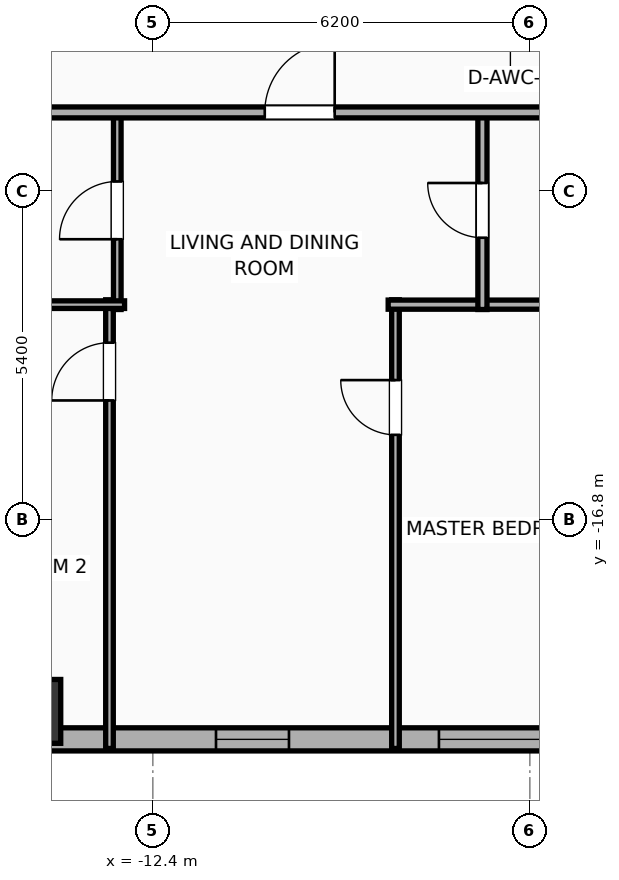
"""IFC4 building model, lengths in metres.
Left out: names, types, materials, properties, quantities, classifications, styles, units other than length and angle.
Written with IfcOpenShell. Run it as: python <this file> out.ifc"""

import sys

from ifc_helpers import new_model, si_unit, direction, frame, frame_2d, origin, origin_2d, place, context, subcontext, project, spatial, rectangle, hollow_rectangle, extrude, element, fill, save


model = new_model("IFC4")
c1 = context("Model", 3, precision=1e-05, world=origin(), true_north=direction((0.0, 1.0)))
c2 = subcontext(c1, "Body", "Model", "MODEL_VIEW")
j1 = project(units=[si_unit("LENGTHUNIT", "METRE"), si_unit("PLANEANGLEUNIT", "RADIAN")], contexts=[c1])
p1 = place(None, origin())
s1 = spatial("IfcSite", under=j1, at=p1, CompositionType="ELEMENT")
p2 = place(p1, origin())
s2 = spatial("IfcBuilding", under=s1, at=p2, CompositionType="ELEMENT")
p3 = place(p2, frame((0.0, 0.0, 105.3)))
s3 = spatial("IfcBuildingStorey", under=s2, at=p3, CompositionType="ELEMENT", Elevation=105.3)
p4 = place(p3, frame((-14.44, -19.95, 0.0), z_axis=(0.0, 0.0, 1.0), x_axis=(1.0, 0.0, 0.0)))
e1 = element("IfcColumn", 1, at=p4, inside=s3, PredefinedType="COLUMN", context=c2, shape_type="SweptSolid", body=[
    extrude(hollow_rectangle(XDim=1.05, YDim=1.05, WallThickness=0.036, at=origin_2d()), origin(), (0.0, 0.0, 1.0), 3.9),
])
p5 = place(p3, frame((29.381, -20.41, 0.0), z_axis=(0.0, 0.0, 1.0), x_axis=(-1.0, 0.0, 0.0)))
e2 = element("IfcWall", 2, at=p5, inside=s3, PredefinedType="ELEMENTEDWALL", context=c2, shape_type="SweptSolid", body=[
    extrude(rectangle(XDim=54.763, YDim=0.38, at=frame_2d((27.381, 0.0))), origin(), (0.0, 0.0, 1.0), 3.65),
])
p6 = place(p5, frame((6.495, 0.0, 0.75)))
e3 = element("IfcOpeningElement", 3, at=p6, cuts=e2, PredefinedType="OPENING", context=c2, shape_type="SweptSolid", body=[
    extrude(rectangle(XDim=2.4, YDim=2.1, at=frame_2d((1.2, 1.05))), frame((0.0, 0.2, 0.0), z_axis=(0.0, -1.0, 0.0), x_axis=(1.0, 0.0, 0.0)), (0.0, 0.0, 1.0), 0.4),
])
p7 = place(p5, frame((17.686, 0.0, 0.75)))
e4 = element("IfcOpeningElement", 4, at=p7, cuts=e2, PredefinedType="OPENING", context=c2, shape_type="SweptSolid", body=[
    extrude(rectangle(XDim=2.4, YDim=2.1, at=frame_2d((1.2, 1.05))), frame((0.0, 0.2, 0.0), z_axis=(0.0, -1.0, 0.0), x_axis=(1.0, 0.0, 0.0)), (0.0, 0.0, 1.0), 0.4),
])
p8 = place(p5, frame((34.677, 0.0, 0.75)))
e5 = element("IfcOpeningElement", 5, at=p8, cuts=e2, PredefinedType="OPENING", context=c2, shape_type="SweptSolid", body=[
    extrude(rectangle(XDim=2.4, YDim=2.1, at=frame_2d((1.2, 1.05))), frame((0.0, 0.2, 0.0), z_axis=(0.0, -1.0, 0.0), x_axis=(1.0, 0.0, 0.0)), (0.0, 0.0, 1.0), 0.4),
])
p9 = place(p5, frame((45.867, 0.0, 0.75)))
e6 = element("IfcOpeningElement", 6, at=p9, cuts=e2, PredefinedType="OPENING", context=c2, shape_type="SweptSolid", body=[
    extrude(rectangle(XDim=2.4, YDim=2.1, at=frame_2d((1.2, 1.05))), frame((0.0, 0.2, 0.0), z_axis=(0.0, -1.0, 0.0), x_axis=(1.0, 0.0, 0.0)), (0.0, 0.0, 1.0), 0.4),
])
p10 = place(p5, frame((52.281, 0.0, 0.75)))
e7 = element("IfcOpeningElement", 7, at=p10, cuts=e2, PredefinedType="OPENING", context=c2, shape_type="SweptSolid", body=[
    extrude(rectangle(XDim=1.2, YDim=2.05, at=frame_2d((0.6, 1.025))), frame((0.0, 0.2, 0.0), z_axis=(0.0, -1.0, 0.0), x_axis=(1.0, 0.0, 0.0)), (0.0, 0.0, 1.0), 0.4),
])
p11 = place(p5, frame((49.641, 0.0, 0.75)))
e8 = element("IfcOpeningElement", 8, at=p11, cuts=e2, PredefinedType="OPENING", context=c2, shape_type="SweptSolid", body=[
    extrude(rectangle(XDim=1.2, YDim=2.05, at=frame_2d((0.6, 1.025))), frame((0.0, 0.2, 0.0), z_axis=(0.0, -1.0, 0.0), x_axis=(1.0, 0.0, 0.0)), (0.0, 0.0, 1.0), 0.4),
])
p12 = place(p5, frame((39.543, 0.0, 0.75)))
e9 = element("IfcOpeningElement", 9, at=p12, cuts=e2, PredefinedType="OPENING", context=c2, shape_type="SweptSolid", body=[
    extrude(rectangle(XDim=1.2, YDim=2.05, at=frame_2d((0.6, 1.025))), frame((0.0, 0.2, 0.0), z_axis=(0.0, -1.0, 0.0), x_axis=(1.0, 0.0, 0.0)), (0.0, 0.0, 1.0), 0.4),
])
p13 = place(p5, frame((44.538, 0.0, 0.75)))
e10 = element("IfcOpeningElement", 10, at=p13, cuts=e2, PredefinedType="OPENING", context=c2, shape_type="SweptSolid", body=[
    extrude(rectangle(XDim=0.52, YDim=2.05, at=frame_2d((0.26, 1.025))), frame((0.0, 0.2, 0.0), z_axis=(0.0, -1.0, 0.0), x_axis=(1.0, 0.0, 0.0)), (0.0, 0.0, 1.0), 0.4),
])
p14 = place(p5, frame((28.206, 0.0, 0.75)))
e11 = element("IfcOpeningElement", 11, at=p14, cuts=e2, PredefinedType="OPENING", context=c2, shape_type="SweptSolid", body=[
    extrude(rectangle(XDim=1.2, YDim=2.05, at=frame_2d((0.6, 1.025))), frame((0.0, 0.2, 0.0), z_axis=(0.0, -1.0, 0.0), x_axis=(1.0, 0.0, 0.0)), (0.0, 0.0, 1.0), 0.4),
])
p15 = place(p5, frame((31.241, 0.0, 0.75)))
e12 = element("IfcOpeningElement", 12, at=p15, cuts=e2, PredefinedType="OPENING", context=c2, shape_type="SweptSolid", body=[
    extrude(rectangle(XDim=0.85, YDim=2.05, at=frame_2d((0.425, 1.025))), frame((0.0, 0.2, 0.0), z_axis=(0.0, -1.0, 0.0), x_axis=(1.0, 0.0, 0.0)), (0.0, 0.0, 1.0), 0.4),
])
p16 = place(p5, frame((24.561, 0.0, 0.75)))
e13 = element("IfcOpeningElement", 13, at=p16, cuts=e2, PredefinedType="OPENING", context=c2, shape_type="SweptSolid", body=[
    extrude(rectangle(XDim=1.2, YDim=2.05, at=frame_2d((0.6, 1.025))), frame((0.0, 0.2, 0.0), z_axis=(0.0, -1.0, 0.0), x_axis=(1.0, 0.0, 0.0)), (0.0, 0.0, 1.0), 0.4),
])
p17 = place(p5, frame((22.561, 0.0, 0.75)))
e14 = element("IfcOpeningElement", 14, at=p17, cuts=e2, PredefinedType="OPENING", context=c2, shape_type="SweptSolid", body=[
    extrude(rectangle(XDim=0.52, YDim=2.05, at=frame_2d((0.26, 1.025))), frame((0.0, 0.2, 0.0), z_axis=(0.0, -1.0, 0.0), x_axis=(1.0, 0.0, 0.0)), (0.0, 0.0, 1.0), 0.4),
])
p18 = place(p5, frame((13.886, 0.0, 0.75)))
e15 = element("IfcOpeningElement", 15, at=p18, cuts=e2, PredefinedType="OPENING", context=c2, shape_type="SweptSolid", body=[
    extrude(rectangle(XDim=1.2, YDim=2.05, at=frame_2d((0.6, 1.025))), frame((0.0, 0.2, 0.0), z_axis=(0.0, -1.0, 0.0), x_axis=(1.0, 0.0, 0.0)), (0.0, 0.0, 1.0), 0.4),
])
p19 = place(p5, frame((11.694, 0.0, 0.75)))
e16 = element("IfcOpeningElement", 16, at=p19, cuts=e2, PredefinedType="OPENING", context=c2, shape_type="SweptSolid", body=[
    extrude(rectangle(XDim=0.85, YDim=2.05, at=frame_2d((0.425, 1.025))), frame((0.0, 0.2, 0.0), z_axis=(0.0, -1.0, 0.0), x_axis=(1.0, 0.0, 0.0)), (0.0, 0.0, 1.0), 0.4),
])
p20 = place(p5, frame((3.286, 0.0, 0.75)))
e17 = element("IfcOpeningElement", 17, at=p20, cuts=e2, PredefinedType="OPENING", context=c2, shape_type="SweptSolid", body=[
    extrude(rectangle(XDim=1.2, YDim=2.05, at=frame_2d((0.6, 1.025))), frame((0.0, 0.2, 0.0), z_axis=(0.0, -1.0, 0.0), x_axis=(1.0, 0.0, 0.0)), (0.0, 0.0, 1.0), 0.4),
])
p21 = place(p5, frame((0.816, 0.0, 0.75)))
e18 = element("IfcOpeningElement", 18, at=p21, cuts=e2, PredefinedType="OPENING", context=c2, shape_type="SweptSolid", body=[
    extrude(rectangle(XDim=1.2, YDim=2.05, at=frame_2d((0.6, 1.025))), frame((0.0, 0.2, 0.0), z_axis=(0.0, -1.0, 0.0), x_axis=(1.0, 0.0, 0.0)), (0.0, 0.0, 1.0), 0.4),
])
p22 = place(p3, frame((-13.113, -20.56, 0.0), z_axis=(0.0, 0.0, 1.0), x_axis=(0.0, 1.0, 0.0)))
e19 = element("IfcWall", 19, at=p22, inside=s3, PredefinedType="PARTITIONING", context=c2, shape_type="SweptSolid", body=[
    extrude(rectangle(XDim=7.379, YDim=0.125, at=frame_2d((3.689, 0.0))), origin(), (0.0, 0.0, 1.0), 3.65),
])
p23 = place(p22, frame((5.723, 0.0, 0.0)))
e20 = element("IfcOpeningElement", 20, at=p23, cuts=e19, PredefinedType="OPENING", context=c2, shape_type="SweptSolid", body=[
    extrude(rectangle(XDim=0.95, YDim=2.05, at=frame_2d((0.475, 1.025))), frame((0.0, 0.073, 0.0), z_axis=(0.0, -1.0, 0.0), x_axis=(1.0, 0.0, 0.0)), (0.0, 0.0, 1.0), 0.145),
])
p24 = place(p3, frame((-8.41, -20.56, 0.0), z_axis=(0.0, 0.0, 1.0), x_axis=(0.0, 1.0, 0.0)))
e21 = element("IfcWall", 21, at=p24, inside=s3, PredefinedType="PARTITIONING", context=c2, shape_type="SweptSolid", body=[
    extrude(rectangle(XDim=7.379, YDim=0.125, at=frame_2d((3.689, 0.0))), origin(), (0.0, 0.0, 1.0), 3.65),
])
p25 = place(p24, frame((5.158, 0.0, 0.0)))
e22 = element("IfcOpeningElement", 22, at=p25, cuts=e21, PredefinedType="OPENING", context=c2, shape_type="SweptSolid", body=[
    extrude(rectangle(XDim=0.9, YDim=2.05, at=frame_2d((0.45, 1.025))), frame((0.0, 0.073, 0.0), z_axis=(0.0, -1.0, 0.0), x_axis=(1.0, 0.0, 0.0)), (0.0, 0.0, 1.0), 0.145),
])
p26 = place(p3, frame((-8.53, -13.261, 0.0), z_axis=(0.0, 0.0, 1.0), x_axis=(1.0, 0.0, 0.0)))
e23 = element("IfcWall", 23, at=p26, inside=s3, PredefinedType="PLUMBINGWALL", context=c2, shape_type="SweptSolid", body=[
    extrude(rectangle(XDim=3.79, YDim=0.15, at=frame_2d((1.895, 0.0))), origin(), (0.0, 0.0, 1.0), 3.65),
])
p27 = place(p3, frame((-12.985, -13.341, 0.0), z_axis=(0.0, 0.0, 1.0), x_axis=(0.0, 1.0, 0.0)))
e24 = element("IfcWall", 24, at=p27, inside=s3, PredefinedType="PARTITIONING", context=c2, shape_type="SweptSolid", body=[
    extrude(rectangle(XDim=3.261, YDim=0.125, at=frame_2d((1.63, 0.0))), origin(), (0.0, 0.0, 1.0), 3.65),
])
p28 = place(p27, frame((1.156, 0.0, 0.0)))
e25 = element("IfcOpeningElement", 25, at=p28, cuts=e24, PredefinedType="OPENING", context=c2, shape_type="SweptSolid", body=[
    extrude(rectangle(XDim=0.95, YDim=2.05, at=frame_2d((0.475, 1.025))), frame((0.0, 0.073, 0.0), z_axis=(0.0, -1.0, 0.0), x_axis=(1.0, 0.0, 0.0)), (0.0, 0.0, 1.0), 0.145),
])
p29 = place(p3, frame((-16.06, -13.261, 0.0), z_axis=(0.0, 0.0, 1.0), x_axis=(1.0, 0.0, 0.0)))
e26 = element("IfcWall", 26, at=p29, inside=s3, PredefinedType="PARTITIONING", context=c2, shape_type="SweptSolid", body=[
    extrude(rectangle(XDim=3.195, YDim=0.125, at=frame_2d((1.598, 0.0))), origin(), (0.0, 0.0, 1.0), 3.65),
])
p30 = place(p3, frame((-6.98, -13.341, 0.0), z_axis=(0.0, 0.0, 1.0), x_axis=(0.0, 1.0, 0.0)))
e27 = element("IfcWall", 27, at=p30, inside=s3, PredefinedType="PLUMBINGWALL", context=c2, shape_type="SweptSolid", body=[
    extrude(rectangle(XDim=3.261, YDim=0.15, at=frame_2d((1.63, 0.0))), origin(), (0.0, 0.0, 1.0), 3.65),
])
p31 = place(p30, frame((1.18, 0.0, 0.0)))
e28 = element("IfcOpeningElement", 28, at=p31, cuts=e27, PredefinedType="OPENING", context=c2, shape_type="SweptSolid", body=[
    extrude(rectangle(XDim=0.9, YDim=2.05, at=frame_2d((0.45, 1.025))), frame((0.0, 0.085, 0.0), z_axis=(0.0, -1.0, 0.0), x_axis=(1.0, 0.0, 0.0)), (0.0, 0.0, 1.0), 0.17),
])
p32 = place(p3, frame((-29.21, -10.1, 0.0), z_axis=(0.0, 0.0, 1.0), x_axis=(1.0, 0.0, 0.0)))
e29 = element("IfcWall", 29, at=p32, inside=s3, PredefinedType="PARTITIONING", context=c2, shape_type="SweptSolid", body=[
    extrude(rectangle(XDim=62.42, YDim=0.18, at=frame_2d((31.21, 0.0))), origin(), (0.0, 0.0, 1.0), 3.65),
])
p33 = place(p32, frame((3.033, 0.0, 0.0)))
e30 = element("IfcOpeningElement", 30, at=p33, cuts=e29, PredefinedType="OPENING", context=c2, shape_type="SweptSolid", body=[
    extrude(rectangle(XDim=0.9, YDim=2.05, at=frame_2d((0.45, 1.025))), frame((0.0, 0.1, 0.0), z_axis=(0.0, -1.0, 0.0), x_axis=(1.0, 0.0, 0.0)), (0.0, 0.0, 1.0), 0.2),
])
p34 = place(p32, frame((9.768, 0.0, 0.0)))
e31 = element("IfcOpeningElement", 31, at=p34, cuts=e29, PredefinedType="OPENING", context=c2, shape_type="SweptSolid", body=[
    extrude(rectangle(XDim=0.9, YDim=2.05, at=frame_2d((0.45, 1.025))), frame((0.0, 0.1, 0.0), z_axis=(0.0, -1.0, 0.0), x_axis=(1.0, 0.0, 0.0)), (0.0, 0.0, 1.0), 0.2),
])
p35 = place(p32, frame((18.65, 0.0, 0.0)))
e32 = element("IfcOpeningElement", 32, at=p35, cuts=e29, PredefinedType="OPENING", context=c2, shape_type="SweptSolid", body=[
    extrude(rectangle(XDim=1.15, YDim=2.05, at=frame_2d((0.575, 1.025))), frame((0.0, 0.1, 0.0), z_axis=(0.0, -1.0, 0.0), x_axis=(1.0, 0.0, 0.0)), (0.0, 0.0, 1.0), 0.2),
])
p36 = place(p32, frame((29.212, 0.0, 0.0)))
e33 = element("IfcOpeningElement", 33, at=p36, cuts=e29, PredefinedType="OPENING", context=c2, shape_type="SweptSolid", body=[
    extrude(rectangle(XDim=1.15, YDim=2.05, at=frame_2d((0.575, 1.025))), frame((0.0, 0.1, 0.0), z_axis=(0.0, -1.0, 0.0), x_axis=(1.0, 0.0, 0.0)), (0.0, 0.0, 1.0), 0.2),
])
p37 = place(p32, frame((40.379, 0.0, 0.0)))
e34 = element("IfcOpeningElement", 34, at=p37, cuts=e29, PredefinedType="OPENING", context=c2, shape_type="SweptSolid", body=[
    extrude(rectangle(XDim=1.15, YDim=2.05, at=frame_2d((0.575, 1.025))), frame((0.0, 0.1, 0.0), z_axis=(0.0, -1.0, 0.0), x_axis=(1.0, 0.0, 0.0)), (0.0, 0.0, 1.0), 0.2),
])
p38 = place(p32, frame((50.959, 0.0, 0.0)))
e35 = element("IfcOpeningElement", 35, at=p38, cuts=e29, PredefinedType="OPENING", context=c2, shape_type="SweptSolid", body=[
    extrude(rectangle(XDim=1.15, YDim=2.05, at=frame_2d((0.575, 1.025))), frame((0.0, 0.1, 0.0), z_axis=(0.0, -1.0, 0.0), x_axis=(1.0, 0.0, 0.0)), (0.0, 0.0, 1.0), 0.2),
])
p39 = place(p32, frame((59.117, 0.0, 0.0)))
e36 = element("IfcOpeningElement", 36, at=p39, cuts=e29, PredefinedType="OPENING", context=c2, shape_type="SweptSolid", body=[
    extrude(rectangle(XDim=0.9, YDim=2.05, at=frame_2d((0.45, 1.025))), frame((0.0, 0.1, 0.0), z_axis=(0.0, -1.0, 0.0), x_axis=(1.0, 0.0, 0.0)), (0.0, 0.0, 1.0), 0.2),
])
p40 = place(p8, origin())
e37 = element("IfcWindow", 37, at=p40, inside=s3, PartitioningType="SINGLE_PANEL", PredefinedType="WINDOW", context=c2, shape_type="SweptSolid", body=[
    extrude(rectangle(XDim=2.4, YDim=2.1, at=frame_2d((1.2, 1.05))), frame((0.0, 0.03, 0.0), z_axis=(0.0, -1.0, 0.0), x_axis=(1.0, 0.0, 0.0)), (0.0, 0.0, 1.0), 0.06),
])
fill(e5, e37)
p41 = place(p12, origin())
e38 = element("IfcWindow", 38, at=p41, inside=s3, PartitioningType="SINGLE_PANEL", PredefinedType="WINDOW", context=c2, shape_type="SweptSolid", body=[
    extrude(rectangle(XDim=1.2, YDim=2.05, at=frame_2d((0.6, 1.025))), frame((0.0, 0.03, 0.0), z_axis=(0.0, -1.0, 0.0), x_axis=(1.0, 0.0, 0.0)), (0.0, 0.0, 1.0), 0.06),
])
fill(e9, e38)
p42 = place(p23, origin())
e39 = element("IfcDoor", 39, at=p42, inside=s3, OperationType="SINGLE_SWING_LEFT", PredefinedType="DOOR", context=c2, shape_type="SweptSolid", body=[
    extrude(rectangle(XDim=0.95, YDim=2.05, at=frame_2d((0.475, 1.025))), frame((0.0, 0.025, 0.0), z_axis=(0.0, -1.0, 0.0), x_axis=(1.0, 0.0, 0.0)), (0.0, 0.0, 1.0), 0.05),
])
fill(e20, e39)
p43 = place(p25, origin())
e40 = element("IfcDoor", 40, at=p43, inside=s3, OperationType="SINGLE_SWING_RIGHT", PredefinedType="DOOR", context=c2, shape_type="SweptSolid", body=[
    extrude(rectangle(XDim=0.9, YDim=2.05, at=frame_2d((0.45, 1.025))), frame((0.0, 0.025, 0.0), z_axis=(0.0, -1.0, 0.0), x_axis=(1.0, 0.0, 0.0)), (0.0, 0.0, 1.0), 0.05),
])
fill(e22, e40)
p44 = place(p28, origin())
e41 = element("IfcDoor", 41, at=p44, inside=s3, OperationType="SINGLE_SWING_LEFT", PredefinedType="DOOR", context=c2, shape_type="SweptSolid", body=[
    extrude(rectangle(XDim=0.95, YDim=2.05, at=frame_2d((0.475, 1.025))), frame((0.0, 0.025, 0.0), z_axis=(0.0, -1.0, 0.0), x_axis=(1.0, 0.0, 0.0)), (0.0, 0.0, 1.0), 0.05),
])
fill(e25, e41)
p45 = place(p31, origin())
e42 = element("IfcDoor", 42, at=p45, inside=s3, OperationType="SINGLE_SWING_RIGHT", PredefinedType="DOOR", context=c2, shape_type="SweptSolid", body=[
    extrude(rectangle(XDim=0.9, YDim=2.05, at=frame_2d((0.45, 1.025))), frame((0.0, 0.025, 0.0), z_axis=(0.0, -1.0, 0.0), x_axis=(1.0, 0.0, 0.0)), (0.0, 0.0, 1.0), 0.05),
])
fill(e28, e42)
p46 = place(p35, origin())
e43 = element("IfcDoor", 43, at=p46, inside=s3, OperationType="SINGLE_SWING_RIGHT", PredefinedType="DOOR", context=c2, shape_type="SweptSolid", body=[
    extrude(rectangle(XDim=1.15, YDim=2.05, at=frame_2d((0.575, 1.025))), frame((0.0, 0.025, 0.0), z_axis=(0.0, -1.0, 0.0), x_axis=(1.0, 0.0, 0.0)), (0.0, 0.0, 1.0), 0.05),
])
fill(e32, e43)
save(model, sys.argv[1])
